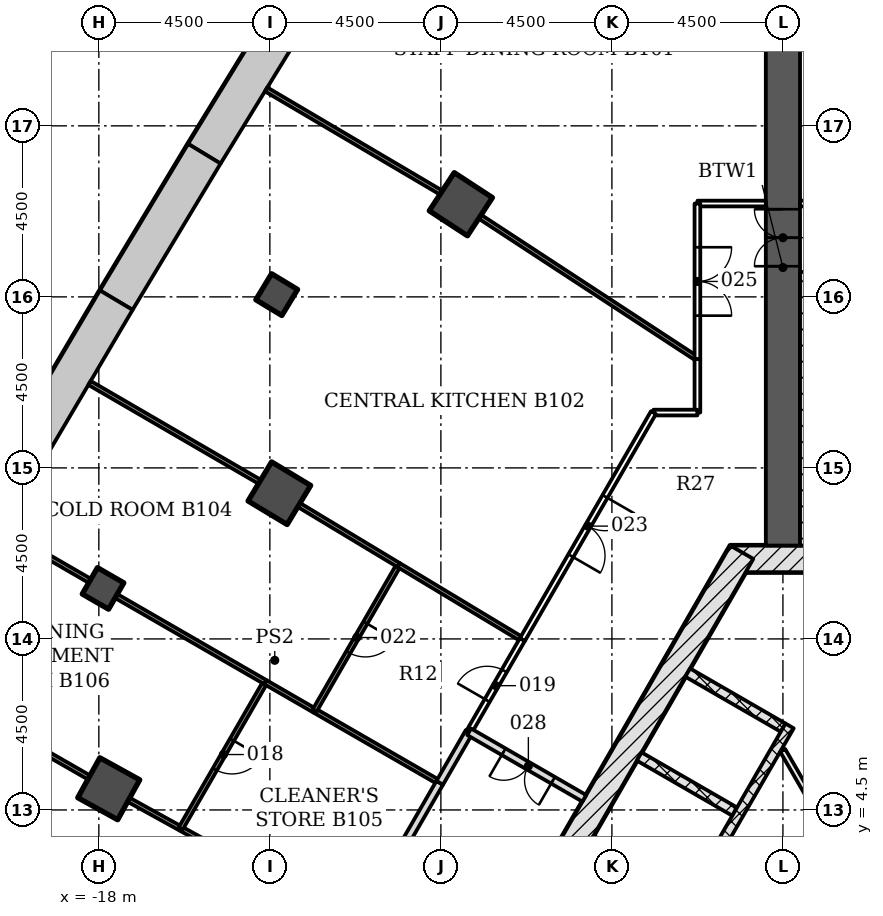
"""IFC4 building model, lengths in metres.
Left out: names, types, materials, properties, quantities, classifications, styles, units other than length and angle.
Written with IfcOpenShell. Run it as: python <this file> out.ifc"""

import sys

from ifc_helpers import new_model, si_unit, direction, frame, frame_2d, origin, origin_2d, place, context, subcontext, project, spatial, polyline, rectangle, outline, extrude, element, fill, save


model = new_model("IFC4")
c1 = context("Model", 3, precision=1e-05, world=origin(), true_north=direction((0.0, 1.0)))
c2 = subcontext(c1, "Body", "Model", "MODEL_VIEW")
j1 = project(units=[si_unit("LENGTHUNIT", "METRE"), si_unit("PLANEANGLEUNIT", "RADIAN")], contexts=[c1])
p1 = place(None, origin())
s1 = spatial("IfcSite", under=j1, at=p1, CompositionType="ELEMENT")
p2 = place(p1, origin())
s2 = spatial("IfcBuilding", under=s1, at=p2, CompositionType="ELEMENT")
p3 = place(p2, frame((0.0, 0.0, -4.5)))
s3 = spatial("IfcBuildingStorey", under=s2, at=p3, CompositionType="ELEMENT", Elevation=-4.5)
p4 = place(p3, origin())
e1 = element("IfcWall", 1, at=p4, inside=s3, PredefinedType="SOLIDWALL", context=c2, shape_type="SweptSolid", body=[
    extrude(outline(polyline([(-13.297, 25.861), (-15.652, 22.026), (-14.797, 21.506), (-12.448, 25.334), (-13.297, 25.861)])), origin(), (0.0, 0.0, 1.0), 4.25),
])
p5 = place(p3, origin())
e2 = element("IfcWall", 2, at=p5, inside=s3, PredefinedType="SOLIDWALL", context=c2, shape_type="SweptSolid", body=[
    extrude(outline(polyline([(-15.652, 22.026), (-17.971, 18.17), (-17.112, 17.658), (-14.797, 21.506), (-15.652, 22.026)])), origin(), (0.0, 0.0, 1.0), 4.25),
])
p6 = place(p3, origin())
e3 = element("IfcWall", 3, at=p6, inside=s3, PredefinedType="SOLIDWALL", context=c2, shape_type="SweptSolid", body=[
    extrude(outline(polyline([(-17.971, 18.17), (-20.256, 14.293), (-19.393, 13.789), (-17.112, 17.658), (-17.971, 18.17)])), origin(), (0.0, 0.0, 1.0), 4.25),
])
for number, where, z_axis, x_axis in (
    (4, (-8.475, 20.438, -0.3), (0.0, 0.0, 1.0), (-0.837, 0.547, 0.0)),
    (5, (-13.25, 12.834, -0.3), (0.0, 0.0, 1.0), (-0.857, 0.516, 0.0)),
    (6, (-17.739, 5.058, -0.3), (0.0, 0.0, 1.0), (-0.875, 0.484, 0.0)),
):
    element("IfcColumn", number, at=place(p3, frame(where, z_axis=z_axis, x_axis=x_axis)), inside=s3, PredefinedType="COLUMN", context=c2, shape_type="SweptSolid", body=[
        extrude(rectangle(XDim=1.2, YDim=1.2, at=origin_2d()), origin(), (0.0, 0.0, 1.0), 4.55),
    ])
for number, where, z_axis, x_axis in (
    (7, (-13.32, 18.059, -0.3), (0.0, 0.0, 1.0), (-0.856, 0.518, 0.0)),
    (8, (-17.89, 10.329, -0.3), (0.0, 0.0, 1.0), (-0.866, 0.5, 0.0)),
):
    element("IfcColumn", number, at=place(p3, frame(where, z_axis=z_axis, x_axis=x_axis)), inside=s3, PredefinedType="COLUMN", context=c2, shape_type="SweptSolid", body=[
        extrude(rectangle(XDim=0.8, YDim=0.8, at=origin_2d()), origin(), (0.0, 0.0, 1.0), 4.55),
    ])
p7 = place(p3, frame((1.386, 11.106, -0.3), z_axis=(0.0, 0.0, 1.0), x_axis=(-1.0, 0.0, 0.0)))
e9 = element("IfcWall", 9, at=p7, inside=s3, PredefinedType="SHEAR", context=c2, shape_type="SweptSolid", body=[
    extrude(rectangle(XDim=2.771, YDim=0.7, at=frame_2d((1.386, 0.0))), origin(), (0.0, 0.0, 1.0), 4.55),
])
p8 = place(p3, frame((-1.083, 11.281, -0.3), z_axis=(0.0, 0.0, 1.0), x_axis=(-0.500001446645, -0.866024568562, 0.0)))
e10 = element("IfcWall", 10, at=p8, inside=s3, PredefinedType="SHEAR", context=c2, shape_type="SweptSolid", body=[
    extrude(rectangle(XDim=18.458, YDim=0.7, at=frame_2d((9.229, 0.0))), origin(), (0.0, 0.0, 1.0), 4.55),
])
p9 = place(p8, frame((8.979, 0.0, 0.3)))
e11 = element("IfcOpeningElement", 11, at=p9, cuts=e10, PredefinedType="OPENING", context=c2, shape_type="SweptSolid", body=[
    extrude(rectangle(XDim=1.2, YDim=2.1, at=frame_2d((0.6, 1.05))), frame((0.0, 0.36, 0.0), z_axis=(0.0, -1.0, 0.0), x_axis=(1.0, 0.0, 0.0)), (0.0, 0.0, 1.0), 0.72),
])
p10 = place(p8, frame((11.029, 0.0, 0.3)))
e12 = element("IfcOpeningElement", 12, at=p10, cuts=e10, PredefinedType="OPENING", context=c2, shape_type="SweptSolid", body=[
    extrude(rectangle(XDim=1.2, YDim=2.1, at=frame_2d((0.6, 1.05))), frame((0.0, 0.36, 0.0), z_axis=(0.0, -1.0, 0.0), x_axis=(1.0, 0.0, 0.0)), (0.0, 0.0, 1.0), 0.72),
])
p11 = place(p3, frame((0.0, 11.456, -0.3), z_axis=(0.0, 0.0, 1.0), x_axis=(0.0, 1.0, 0.0)))
e13 = element("IfcWall", 13, at=p11, inside=s3, PredefinedType="SHEAR", context=c2, shape_type="SweptSolid", body=[
    extrude(rectangle(XDim=14.633, YDim=0.9, at=frame_2d((7.316, 0.0))), origin(), (0.0, 0.0, 1.0), 4.55),
])
p12 = place(p11, frame((7.35, 0.0, 0.3)))
e14 = element("IfcOpeningElement", 14, at=p12, cuts=e13, PredefinedType="OPENING", context=c2, shape_type="SweptSolid", body=[
    extrude(rectangle(XDim=1.5, YDim=2.1, at=frame_2d((0.75, 1.05))), frame((0.0, 0.46, 0.0), z_axis=(0.0, -1.0, 0.0), x_axis=(1.0, 0.0, 0.0)), (0.0, 0.0, 1.0), 0.92),
])
p13 = place(p3, frame((-2.506, 8.115, 0.0), z_axis=(0.0, 0.0, 1.0), x_axis=(0.865996321171, -0.50005036918, 0.0)))
e15 = element("IfcWall", 15, at=p13, inside=s3, PredefinedType="PARTITIONING", context=c2, shape_type="SweptSolid", body=[
    extrude(rectangle(XDim=2.9, YDim=0.25, at=frame_2d((1.45, 0.0))), origin(), (0.0, 0.0, 1.0), 4.25),
])
p14 = place(p3, frame((-3.781, 5.907, 0.0), z_axis=(0.0, 0.0, 1.0), x_axis=(0.866032775405, -0.499987231761, 0.0)))
e16 = element("IfcWall", 16, at=p14, inside=s3, PredefinedType="PARTITIONING", context=c2, shape_type="SweptSolid", body=[
    extrude(rectangle(XDim=2.9, YDim=0.25, at=frame_2d((1.45, 0.0))), origin(), (0.0, 0.0, 1.0), 4.25),
])
p15 = place(p3, frame((-5.056, 3.699, -0.3), z_axis=(0.0, 0.0, 1.0), x_axis=(0.866032775405, -0.499987231761, 0.0)))
e17 = element("IfcWall", 17, at=p15, inside=s3, PredefinedType="PARTITIONING", context=c2, shape_type="SweptSolid", body=[
    extrude(rectangle(XDim=2.9, YDim=0.25, at=frame_2d((1.45, 0.0))), origin(), (0.0, 0.0, 1.0), 4.55),
])
p16 = place(p3, frame((0.176, 6.711, 0.0), z_axis=(0.0, 0.0, 1.0), x_axis=(-0.500004227369, -0.866022963098, 0.0)))
e18 = element("IfcWall", 18, at=p16, inside=s3, PredefinedType="PARTITIONING", context=c2, shape_type="SweptSolid", body=[
    extrude(rectangle(XDim=11.8, YDim=0.25, at=frame_2d((5.9, 0.0))), origin(), (0.0, 0.0, 1.0), 4.25),
])
p17 = place(p3, frame((2.099, 2.42, 0.0), z_axis=(0.0, 0.0, 1.0), x_axis=(-0.499998449073, 0.866026299211, 0.0)))
e19 = element("IfcWall", 19, at=p17, inside=s3, PredefinedType="PARTITIONING", context=c2, shape_type="SweptSolid", body=[
    extrude(rectangle(XDim=4.211, YDim=0.15, at=frame_2d((2.106, 0.0))), origin(), (0.0, 0.0, 1.0), 4.25),
])
p18 = place(p3, frame((1.018, 11.456, -0.3), z_axis=(0.0, 0.0, 1.0), x_axis=(0.0, 1.0, 0.0)))
e20 = element("IfcWall", 20, at=p18, inside=s3, PredefinedType="SHEAR", context=c2, shape_type="SweptSolid", body=[
    extrude(rectangle(XDim=7.2, YDim=1.136, at=frame_2d((3.6, 0.0))), origin(), (0.0, 0.0, 1.0), 4.55),
])
p19 = place(p3, frame((-11.208, 1.446, 0.0), z_axis=(0.0, 0.0, 1.0), x_axis=(-0.875127041283, 0.483893233694, 0.0)))
e21 = element("IfcWall", 21, at=p19, inside=s3, PredefinedType="PARTITIONING", context=c2, shape_type="SweptSolid", body=[
    extrude(rectangle(XDim=5.299, YDim=0.12, at=frame_2d((2.649, 0.0))), origin(), (0.0, 0.0, 1.0), 3.638),
])
p20 = place(p19, frame((2.15, 0.0, 0.0)))
e22 = element("IfcOpeningElement", 22, at=p20, cuts=e21, PredefinedType="OPENING", context=c2, shape_type="SweptSolid", body=[
    extrude(rectangle(XDim=0.9, YDim=2.1, at=frame_2d((0.45, 1.05))), frame((0.0, 0.07, 0.0), z_axis=(0.0, -1.0, 0.0), x_axis=(1.0, 0.0, 0.0)), (0.0, 0.0, 1.0), 0.14),
])
p21 = place(p3, frame((-18.26, 5.356, 0.0), z_axis=(0.0, 0.0, 1.0), x_axis=(-0.867438170848, 0.497544992695, 0.0)))
e23 = element("IfcWall", 23, at=p21, inside=s3, PredefinedType="PARTITIONING", context=c2, shape_type="SweptSolid", body=[
    extrude(rectangle(XDim=5.177, YDim=0.12, at=frame_2d((2.589, 0.0))), origin(), (0.0, 0.0, 1.0), 3.633),
])
p22 = place(p3, frame((-15.848, 4.012, 0.0), z_axis=(0.0, 0.0, 1.0), x_axis=(-0.87521017078, 0.483742862442, 0.0)))
e24 = element("IfcWall", 24, at=p22, inside=s3, PredefinedType="PARTITIONING", context=c2, shape_type="SweptSolid", body=[
    extrude(rectangle(XDim=1.561, YDim=0.12, at=frame_2d((0.781, 0.0))), origin(), (0.0, 0.0, 1.0), 3.638),
])
p23 = place(p3, frame((-9.031, 5.213, 0.0), z_axis=(0.0, 0.0, 1.0), x_axis=(-0.500044734646, -0.865999574684, 0.0)))
e25 = element("IfcWall", 25, at=p23, inside=s3, PredefinedType="PARTITIONING", context=c2, shape_type="SweptSolid", body=[
    extrude(rectangle(XDim=4.35, YDim=0.2, at=frame_2d((2.175, 0.0))), origin(), (0.0, 0.0, 1.0), 3.638),
])
p24 = place(p3, frame((-8.256, 6.555, 0.0), z_axis=(0.0, 0.0, 1.0), x_axis=(-0.500177701192, -0.865922783642, 0.0)))
e26 = element("IfcWall", 26, at=p24, inside=s3, PredefinedType="PARTITIONING", context=c2, shape_type="SweptSolid", body=[
    extrude(rectangle(XDim=1.547, YDim=0.2, at=frame_2d((0.774, 0.0))), origin(), (0.0, 0.0, 1.0), 3.638),
])
p25 = place(p3, frame((-5.226, 4.806, 0.0), z_axis=(0.0, 0.0, 1.0), x_axis=(-0.865949687125, 0.500131122175, 0.0)))
e27 = element("IfcWall", 27, at=p25, inside=s3, PredefinedType="PARTITIONING", context=c2, shape_type="SweptSolid", body=[
    extrude(rectangle(XDim=3.499, YDim=0.2, at=frame_2d((1.75, 0.0))), origin(), (0.0, 0.0, 1.0), 4.25),
])
p26 = place(p25, frame((0.95, 0.0, 0.0)))
e28 = element("IfcOpeningElement", 28, at=p26, cuts=e27, PredefinedType="OPENING", context=c2, shape_type="SweptSolid", body=[
    extrude(rectangle(XDim=1.5, YDim=2.1, at=frame_2d((0.75, 1.05))), frame((0.0, 0.11, 0.0), z_axis=(0.0, -1.0, 0.0), x_axis=(1.0, 0.0, 0.0)), (0.0, 0.0, 1.0), 0.22),
])
p27 = place(p3, frame((7.136, 20.456, 0.0), z_axis=(0.0, 0.0, 1.0), x_axis=(-1.0, 0.0, 0.0)))
e29 = element("IfcWall", 29, at=p27, inside=s3, PredefinedType="PARTITIONING", context=c2, shape_type="SweptSolid", body=[
    extrude(rectangle(XDim=6.686, YDim=0.15, at=frame_2d((3.343, 0.0))), origin(), (0.0, 0.0, 1.0), 3.638),
])
p28 = place(p27, frame((2.45, 0.0, 0.0)))
e30 = element("IfcOpeningElement", 30, at=p28, cuts=e29, PredefinedType="OPENING", context=c2, shape_type="SweptSolid", body=[
    extrude(rectangle(XDim=1.8, YDim=2.1, at=frame_2d((0.9, 1.05))), frame((0.0, 0.085, 0.0), z_axis=(0.0, -1.0, 0.0), x_axis=(1.0, 0.0, 0.0)), (0.0, 0.0, 1.0), 0.17),
])
p29 = place(p3, frame((-13.621, 7.863, 0.0), z_axis=(0.0, 0.0, 1.0), x_axis=(-0.500241930066, -0.865885680332, 0.0)))
e31 = element("IfcWall", 31, at=p29, inside=s3, PredefinedType="PARTITIONING", context=c2, shape_type="SweptSolid", body=[
    extrude(rectangle(XDim=4.448, YDim=0.12, at=frame_2d((2.224, 0.0))), origin(), (0.0, 0.0, 1.0), 3.638),
])
p30 = place(p29, frame((1.75, 0.0, 0.0)))
e32 = element("IfcOpeningElement", 32, at=p30, cuts=e31, PredefinedType="OPENING", context=c2, shape_type="SweptSolid", body=[
    extrude(rectangle(XDim=0.9, YDim=2.1, at=frame_2d((0.45, 1.05))), frame((0.0, 0.07, 0.0), z_axis=(0.0, -1.0, 0.0), x_axis=(1.0, 0.0, 0.0)), (0.0, 0.0, 1.0), 0.14),
])
p31 = place(p3, frame((-9.032, 5.215, 0.0), z_axis=(0.0, 0.0, 1.0), x_axis=(-0.866138487245, 0.49980408253, 0.0)))
e33 = element("IfcWall", 33, at=p31, inside=s3, PredefinedType="PARTITIONING", context=c2, shape_type="SweptSolid", body=[
    extrude(rectangle(XDim=3.797, YDim=0.12, at=frame_2d((1.899, 0.0))), origin(), (0.0, 0.0, 1.0), 3.638),
])
p32 = place(p3, frame((-12.324, 7.115, 0.0), z_axis=(0.0, 0.0, 1.0), x_axis=(-0.865912029007, 0.500196319479, 0.0)))
e34 = element("IfcWall", 34, at=p32, inside=s3, PredefinedType="PARTITIONING", context=c2, shape_type="SweptSolid", body=[
    extrude(rectangle(XDim=1.501, YDim=0.12, at=frame_2d((0.751, 0.0))), origin(), (0.0, 0.0, 1.0), 3.638),
])
p33 = place(p3, frame((-18.237, 10.528, 0.0), z_axis=(0.0, 0.0, 1.0), x_axis=(-0.865891873066, 0.5002312107, 0.0)))
e35 = element("IfcWall", 35, at=p33, inside=s3, PredefinedType="PARTITIONING", context=c2, shape_type="SweptSolid", body=[
    extrude(rectangle(XDim=2.631, YDim=0.12, at=frame_2d((1.315, 0.0))), origin(), (0.0, 0.0, 1.0), 4.25),
])
p34 = place(p3, frame((-13.617, 7.862, 0.0), z_axis=(0.0, 0.0, 1.0), x_axis=(-0.866103979259, 0.499863878583, 0.0)))
e36 = element("IfcWall", 36, at=p34, inside=s3, PredefinedType="PARTITIONING", context=c2, shape_type="SweptSolid", body=[
    extrude(rectangle(XDim=4.533, YDim=0.12, at=frame_2d((2.267, 0.0))), origin(), (0.0, 0.0, 1.0), 3.638),
])
p35 = place(p3, frame((-10.112, 10.942, 0.0), z_axis=(0.0, 0.0, 1.0), x_axis=(-0.500084296963, -0.86597672944, 0.0)))
e37 = element("IfcWall", 37, at=p35, inside=s3, PredefinedType="PARTITIONING", context=c2, shape_type="SweptSolid", body=[
    extrude(rectangle(XDim=4.419, YDim=0.12, at=frame_2d((2.209, 0.0))), origin(), (0.0, 0.0, 1.0), 3.638),
])
p36 = place(p35, frame((1.75, 0.0, 0.0)))
e38 = element("IfcOpeningElement", 38, at=p36, cuts=e37, PredefinedType="OPENING", context=c2, shape_type="SweptSolid", body=[
    extrude(rectangle(XDim=0.9, YDim=2.1, at=frame_2d((0.45, 1.05))), frame((0.0, 0.07, 0.0), z_axis=(0.0, -1.0, 0.0), x_axis=(1.0, 0.0, 0.0)), (0.0, 0.0, 1.0), 0.14),
])
p37 = place(p3, frame((-8.256, 6.558, 0.0), z_axis=(0.0, 0.0, 1.0), x_axis=(0.500081734942, 0.86597820895, 0.0)))
e39 = element("IfcWall", 39, at=p37, inside=s3, PredefinedType="PARTITIONING", context=c2, shape_type="SweptSolid", body=[
    extrude(rectangle(XDim=2.804, YDim=0.15, at=frame_2d((1.402, 0.0))), origin(), (0.0, 0.0, 1.0), 3.638),
])
p38 = place(p37, frame((0.95, 0.0, 0.0)))
e40 = element("IfcOpeningElement", 40, at=p38, cuts=e39, PredefinedType="OPENING", context=c2, shape_type="SweptSolid", body=[
    extrude(rectangle(XDim=0.9, YDim=2.1, at=frame_2d((0.45, 1.05))), frame((0.0, 0.085, 0.0), z_axis=(0.0, -1.0, 0.0), x_axis=(1.0, 0.0, 0.0)), (0.0, 0.0, 1.0), 0.17),
])
p39 = place(p3, frame((-6.857, 8.983, 0.0), z_axis=(0.0, 0.0, 1.0), x_axis=(-0.856573791655, 0.516024553147, 0.0)))
e41 = element("IfcWall", 41, at=p39, inside=s3, PredefinedType="PARTITIONING", context=c2, shape_type="SweptSolid", body=[
    extrude(rectangle(XDim=3.802, YDim=0.12, at=frame_2d((1.901, 0.0))), origin(), (0.0, 0.0, 1.0), 3.638),
])
p40 = place(p3, frame((-13.769, 13.135, 0.0), z_axis=(0.0, 0.0, 1.0), x_axis=(-0.864615819332, 0.502433562734, 0.0)))
e42 = element("IfcWall", 42, at=p40, inside=s3, PredefinedType="PARTITIONING", context=c2, shape_type="SweptSolid", body=[
    extrude(rectangle(XDim=5.177, YDim=0.12, at=frame_2d((2.588, 0.0))), origin(), (0.0, 0.0, 1.0), 3.633),
])
p41 = place(p3, frame((-10.108, 10.941, 0.0), z_axis=(0.0, 0.0, 1.0), x_axis=(-0.856614023764, 0.515957764058, 0.0)))
e43 = element("IfcWall", 43, at=p41, inside=s3, PredefinedType="PARTITIONING", context=c2, shape_type="SweptSolid", body=[
    extrude(rectangle(XDim=3.068, YDim=0.12, at=frame_2d((1.534, 0.0))), origin(), (0.0, 0.0, 1.0), 3.638),
])
p42 = place(p3, frame((-2.25, 16.367, 0.0), z_axis=(0.0, 0.0, 1.0), x_axis=(0.0, -1.0, 0.0)))
e44 = element("IfcWall", 44, at=p42, inside=s3, PredefinedType="PARTITIONING", context=c2, shape_type="SweptSolid", body=[
    extrude(rectangle(XDim=1.411, YDim=0.15, at=frame_2d((0.706, 0.0))), origin(), (0.0, 0.0, 1.0), 3.638),
])
p43 = place(p3, frame((-2.25, 14.956, 0.0), z_axis=(0.0, 0.0, 1.0), x_axis=(-1.0, 0.0, 0.0)))
e45 = element("IfcWall", 45, at=p43, inside=s3, PredefinedType="PARTITIONING", context=c2, shape_type="SweptSolid", body=[
    extrude(rectangle(XDim=1.156, YDim=0.15, at=frame_2d((0.578, 0.0))), origin(), (0.0, 0.0, 1.0), 4.25),
])
p44 = place(p3, frame((-3.406, 14.956, 0.0), z_axis=(0.0, 0.0, 1.0), x_axis=(-0.500041102678, -0.866001671842, 0.0)))
e46 = element("IfcWall", 46, at=p44, inside=s3, PredefinedType="PARTITIONING", context=c2, shape_type="SweptSolid", body=[
    extrude(rectangle(XDim=6.897, YDim=0.15, at=frame_2d((3.449, 0.0))), origin(), (0.0, 0.0, 1.0), 3.638),
])
p45 = place(p44, frame((2.55, 0.0, 0.0)))
e47 = element("IfcOpeningElement", 47, at=p45, cuts=e46, PredefinedType="OPENING", context=c2, shape_type="SweptSolid", body=[
    extrude(rectangle(XDim=1.8, YDim=2.1, at=frame_2d((0.9, 1.05))), frame((0.0, 0.085, 0.0), z_axis=(0.0, -1.0, 0.0), x_axis=(1.0, 0.0, 0.0)), (0.0, 0.0, 1.0), 0.17),
])
p46 = place(p3, frame((-0.45, 20.456, 0.0), z_axis=(0.0, 0.0, 1.0), x_axis=(-1.0, 0.0, 0.0)))
e48 = element("IfcWall", 48, at=p46, inside=s3, PredefinedType="PARTITIONING", context=c2, shape_type="SweptSolid", body=[
    extrude(rectangle(XDim=1.8, YDim=0.15, at=frame_2d((0.9, 0.0))), origin(), (0.0, 0.0, 1.0), 3.638),
])
p47 = place(p3, frame((-2.25, 20.456, 0.0), z_axis=(0.0, 0.0, 1.0), x_axis=(0.0, -1.0, 0.0)))
e49 = element("IfcWall", 49, at=p47, inside=s3, PredefinedType="PARTITIONING", context=c2, shape_type="SweptSolid", body=[
    extrude(rectangle(XDim=4.089, YDim=0.15, at=frame_2d((2.044, 0.0))), origin(), (0.0, 0.0, 1.0), 3.638),
])
p48 = place(p47, frame((1.15, 0.0, 0.0)))
e50 = element("IfcOpeningElement", 50, at=p48, cuts=e49, PredefinedType="OPENING", context=c2, shape_type="SweptSolid", body=[
    extrude(rectangle(XDim=1.8, YDim=2.1, at=frame_2d((0.9, 1.05))), frame((0.0, 0.085, 0.0), z_axis=(0.0, -1.0, 0.0), x_axis=(1.0, 0.0, 0.0)), (0.0, 0.0, 1.0), 0.17),
])
p49 = place(p3, frame((-8.992, 20.743, 0.0), z_axis=(0.0, 0.0, 1.0), x_axis=(-0.861446814084, 0.507847798563, 0.0)))
e51 = element("IfcWall", 51, at=p49, inside=s3, PredefinedType="PARTITIONING", context=c2, shape_type="SweptSolid", body=[
    extrude(rectangle(XDim=5.348, YDim=0.12, at=frame_2d((2.674, 0.0))), origin(), (0.0, 0.0, 1.0), 3.633),
])
p50 = place(p3, frame((-2.252, 16.367, 0.0), z_axis=(0.0, 0.0, 1.0), x_axis=(-0.83688089218, 0.547385031129, 0.0)))
e52 = element("IfcWall", 52, at=p50, inside=s3, PredefinedType="PARTITIONING", context=c2, shape_type="SweptSolid", body=[
    extrude(rectangle(XDim=6.836, YDim=0.12, at=frame_2d((3.418, 0.0))), origin(), (0.0, 0.0, 1.0), 3.638),
])
p51 = place(p30, origin())
e53 = element("IfcDoor", 53, at=p51, inside=s3, OperationType="SINGLE_SWING_RIGHT", PredefinedType="DOOR", context=c2, shape_type="SweptSolid", body=[
    extrude(rectangle(XDim=0.9, YDim=2.1, at=frame_2d((0.45, 1.05))), frame((0.0, 0.025, 0.0), z_axis=(0.0, -1.0, 0.0), x_axis=(1.0, 0.0, 0.0)), (0.0, 0.0, 1.0), 0.05),
])
fill(e32, e53)
p52 = place(p38, origin())
e54 = element("IfcDoor", 54, at=p52, inside=s3, OperationType="SINGLE_SWING_LEFT", PredefinedType="DOOR", context=c2, shape_type="SweptSolid", body=[
    extrude(rectangle(XDim=0.9, YDim=2.1, at=frame_2d((0.45, 1.05))), frame((0.0, 0.025, 0.0), z_axis=(0.0, -1.0, 0.0), x_axis=(1.0, 0.0, 0.0)), (0.0, 0.0, 1.0), 0.05),
])
fill(e40, e54)
p53 = place(p36, origin())
e55 = element("IfcDoor", 55, at=p53, inside=s3, OperationType="SINGLE_SWING_RIGHT", PredefinedType="DOOR", context=c2, shape_type="SweptSolid", body=[
    extrude(rectangle(XDim=0.9, YDim=2.1, at=frame_2d((0.45, 1.05))), frame((0.0, 0.025, 0.0), z_axis=(0.0, -1.0, 0.0), x_axis=(1.0, 0.0, 0.0)), (0.0, 0.0, 1.0), 0.05),
])
fill(e38, e55)
p54 = place(p45, origin())
e56 = element("IfcDoor", 56, at=p54, inside=s3, OperationType="DOUBLE_DOOR_SINGLE_SWING", PredefinedType="DOOR", context=c2, shape_type="SweptSolid", body=[
    extrude(rectangle(XDim=1.8, YDim=2.1, at=frame_2d((0.9, 1.05))), frame((0.0, 0.025, 0.0), z_axis=(0.0, -1.0, 0.0), x_axis=(1.0, 0.0, 0.0)), (0.0, 0.0, 1.0), 0.05),
])
fill(e47, e56)
p55 = place(p48, origin())
e57 = element("IfcDoor", 57, at=p55, inside=s3, OperationType="DOUBLE_DOOR_SINGLE_SWING", PredefinedType="DOOR", context=c2, shape_type="SweptSolid", body=[
    extrude(rectangle(XDim=1.8, YDim=2.1, at=frame_2d((0.9, 1.05))), frame((0.0, 0.025, 0.0), z_axis=(0.0, -1.0, 0.0), x_axis=(1.0, 0.0, 0.0)), (0.0, 0.0, 1.0), 0.05),
])
fill(e50, e57)
p56 = place(p26, origin())
e58 = element("IfcDoor", 58, at=p56, inside=s3, OperationType="DOUBLE_DOOR_SINGLE_SWING", PredefinedType="DOOR", context=c2, shape_type="SweptSolid", body=[
    extrude(rectangle(XDim=1.5, YDim=2.1, at=frame_2d((0.75, 1.05))), frame((0.0, 0.025, 0.0), z_axis=(0.0, -1.0, 0.0), x_axis=(1.0, 0.0, 0.0)), (0.0, 0.0, 1.0), 0.05),
])
fill(e28, e58)
p57 = place(p12, origin())
e59 = element("IfcDoor", 59, at=p57, inside=s3, OperationType="DOUBLE_DOOR_SINGLE_SWING", PredefinedType="DOOR", context=c2, shape_type="SweptSolid", body=[
    extrude(rectangle(XDim=1.5, YDim=2.1, at=frame_2d((0.75, 1.05))), frame((0.0, 0.025, 0.0), z_axis=(0.0, -1.0, 0.0), x_axis=(1.0, 0.0, 0.0)), (0.0, 0.0, 1.0), 0.05),
])
fill(e14, e59)
save(model, sys.argv[1])
